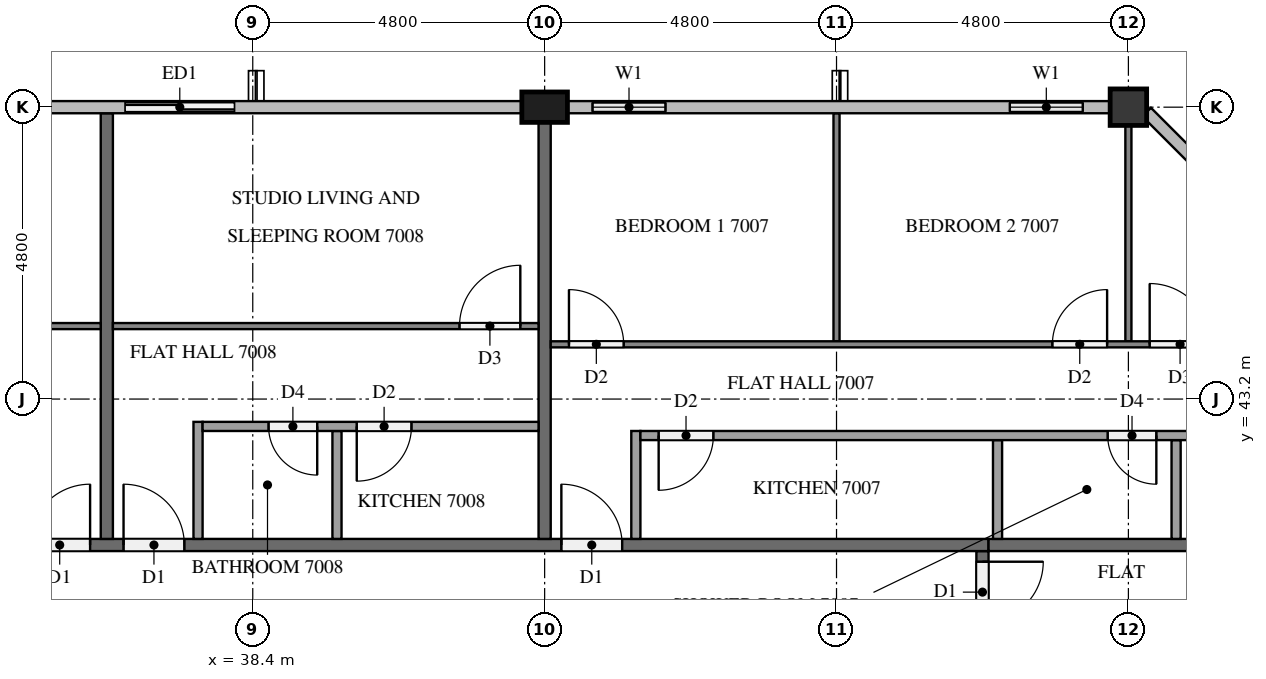
"""IFC4 building model, lengths in metres.
Left out: names, types, materials, properties, quantities, classifications, styles, units other than length and angle.
Written with IfcOpenShell. Run it as: python <this file> out.ifc"""

import sys

from ifc_helpers import new_model, si_unit, direction, frame, frame_2d, origin, origin_2d, place, context, subcontext, project, spatial, rectangle, extrude, element, fill, save


model = new_model("IFC4")
c1 = context("Model", 3, precision=1e-05, world=origin(), true_north=direction((0.0, 1.0)))
c2 = subcontext(c1, "Body", "Model", "MODEL_VIEW")
j1 = project(units=[si_unit("LENGTHUNIT", "METRE"), si_unit("PLANEANGLEUNIT", "RADIAN")], contexts=[c1])
p1 = place(None, origin())
s1 = spatial("IfcSite", under=j1, at=p1, CompositionType="ELEMENT")
p2 = place(p1, origin())
s2 = spatial("IfcBuilding", under=s1, at=p2, CompositionType="ELEMENT")
p3 = place(p2, frame((0.0, 0.0, 268.6)))
s3 = spatial("IfcBuildingStorey", under=s2, at=p3, CompositionType="ELEMENT", Elevation=268.6)
p4 = place(p3, frame((52.8, 48.0, 0.0), z_axis=(0.0, 0.0, 1.0), x_axis=(1.0, 0.0, 0.0)))
e1 = element("IfcColumn", 1, at=p4, inside=s3, PredefinedType="COLUMN", context=c2, shape_type="SweptSolid", body=[
    extrude(rectangle(XDim=0.6, YDim=0.6, at=origin_2d()), origin(), (0.0, 0.0, 1.0), 3.2),
])
p5 = place(p3, frame((43.2, 48.0, 0.0), z_axis=(0.0, 0.0, 1.0), x_axis=(1.0, 0.0, 0.0)))
e2 = element("IfcColumn", 2, at=p5, inside=s3, PredefinedType="COLUMN", context=c2, shape_type="SweptSolid", body=[
    extrude(rectangle(XDim=0.75, YDim=0.5, at=origin_2d()), origin(), (0.0, 0.0, 1.0), 3.2),
])
p6 = place(p3, frame((52.5, 48.0, 0.0), z_axis=(0.0, 0.0, 1.0), x_axis=(-1.0, 0.0, 0.0)))
e3 = element("IfcWall", 3, at=p6, inside=s3, PredefinedType="SOLIDWALL", context=c2, shape_type="SweptSolid", body=[
    extrude(rectangle(XDim=2.1, YDim=0.15, at=frame_2d((1.05, 0.0))), origin(), (0.0, 0.0, 1.0), 3.2),
])
p7 = place(p6, frame((0.45, 0.0, 0.9)))
e4 = element("IfcOpeningElement", 4, at=p7, cuts=e3, PredefinedType="OPENING", context=c2, shape_type="SweptSolid", body=[
    extrude(rectangle(XDim=1.2, YDim=1.4, at=frame_2d((0.6, 0.7))), frame((0.0, 0.085, 0.0), z_axis=(0.0, -1.0, 0.0), x_axis=(1.0, 0.0, 0.0)), (0.0, 0.0, 1.0), 0.17),
])
p8 = place(p3, frame((45.6, 48.0, 0.0), z_axis=(0.0, 0.0, 1.0), x_axis=(-1.0, 0.0, 0.0)))
e5 = element("IfcWall", 5, at=p8, inside=s3, PredefinedType="SOLIDWALL", context=c2, shape_type="SweptSolid", body=[
    extrude(rectangle(XDim=2.025, YDim=0.15, at=frame_2d((1.013, 0.0))), origin(), (0.0, 0.0, 1.0), 3.2),
])
p9 = place(p8, frame((0.413, 0.0, 0.9)))
e6 = element("IfcOpeningElement", 6, at=p9, cuts=e5, PredefinedType="OPENING", context=c2, shape_type="SweptSolid", body=[
    extrude(rectangle(XDim=1.2, YDim=1.4, at=frame_2d((0.6, 0.7))), frame((0.0, 0.085, 0.0), z_axis=(0.0, -1.0, 0.0), x_axis=(1.0, 0.0, 0.0)), (0.0, 0.0, 1.0), 0.17),
])
p10 = place(p3, frame((38.4, 48.0, 0.0), z_axis=(0.0, 0.0, 1.0), x_axis=(-1.0, 0.0, 0.0)))
e7 = element("IfcWall", 7, at=p10, inside=s3, PredefinedType="SOLIDWALL", context=c2, shape_type="SweptSolid", body=[
    extrude(rectangle(XDim=2.4, YDim=0.15, at=frame_2d((1.2, 0.0))), origin(), (0.0, 0.0, 1.0), 3.2),
])
p11 = place(p10, frame((0.3, 0.0, 0.0)))
e8 = element("IfcOpeningElement", 8, at=p11, cuts=e7, PredefinedType="OPENING", context=c2, shape_type="SweptSolid", body=[
    extrude(rectangle(XDim=1.8, YDim=2.4, at=frame_2d((0.9, 1.2))), frame((0.0, 0.085, 0.0), z_axis=(0.0, -1.0, 0.0), x_axis=(1.0, 0.0, 0.0)), (0.0, 0.0, 1.0), 0.17),
])
p12 = place(p3, frame((50.4, 40.7, 0.0), z_axis=(0.0, 0.0, 1.0), x_axis=(0.0, -1.0, 0.0)))
e9 = element("IfcWall", 9, at=p12, inside=s3, PredefinedType="PARTITIONING", context=c2, shape_type="SweptSolid", body=[
    extrude(rectangle(XDim=28.6, YDim=0.2, at=frame_2d((14.3, 0.0))), origin(), (0.0, 0.0, 1.0), 3.2),
])
p13 = place(p12, frame((27.425, 0.0, 0.0)))
e10 = element("IfcOpeningElement", 10, at=p13, cuts=e9, PredefinedType="OPENING", context=c2, shape_type="SweptSolid", body=[
    extrude(rectangle(XDim=1.0, YDim=2.1, at=frame_2d((0.5, 1.05))), frame((0.0, 0.11, 0.0), z_axis=(0.0, -1.0, 0.0), x_axis=(1.0, 0.0, 0.0)), (0.0, 0.0, 1.0), 0.22),
])
p14 = place(p12, frame((0.175, 0.0, 0.0)))
e11 = element("IfcOpeningElement", 11, at=p14, cuts=e9, PredefinedType="OPENING", context=c2, shape_type="SweptSolid", body=[
    extrude(rectangle(XDim=1.0, YDim=2.1, at=frame_2d((0.5, 1.05))), frame((0.0, 0.11, 0.0), z_axis=(0.0, -1.0, 0.0), x_axis=(1.0, 0.0, 0.0)), (0.0, 0.0, 1.0), 0.22),
])
p15 = place(p3, frame((11.9, 40.8, 0.0), z_axis=(0.0, 0.0, 1.0), x_axis=(1.0, 0.0, 0.0)))
e12 = element("IfcWall", 12, at=p15, inside=s3, PredefinedType="PARTITIONING", context=c2, shape_type="SweptSolid", body=[
    extrude(rectangle(XDim=38.6, YDim=0.2, at=frame_2d((19.3, 0.0))), origin(), (0.0, 0.0, 1.0), 3.2),
])
p16 = place(p15, frame((31.575, 0.0, 0.0)))
e13 = element("IfcOpeningElement", 13, at=p16, cuts=e12, PredefinedType="OPENING", context=c2, shape_type="SweptSolid", body=[
    extrude(rectangle(XDim=1.0, YDim=2.1, at=frame_2d((0.5, 1.05))), frame((0.0, 0.11, 0.0), z_axis=(0.0, -1.0, 0.0), x_axis=(1.0, 0.0, 0.0)), (0.0, 0.0, 1.0), 0.22),
])
p17 = place(p15, frame((24.375, 0.0, 0.0)))
e14 = element("IfcOpeningElement", 14, at=p17, cuts=e12, PredefinedType="OPENING", context=c2, shape_type="SweptSolid", body=[
    extrude(rectangle(XDim=1.0, YDim=2.1, at=frame_2d((0.5, 1.05))), frame((0.0, 0.11, 0.0), z_axis=(0.0, -1.0, 0.0), x_axis=(1.0, 0.0, 0.0)), (0.0, 0.0, 1.0), 0.22),
])
p18 = place(p15, frame((22.825, 0.0, 0.0)))
e15 = element("IfcOpeningElement", 15, at=p18, cuts=e12, PredefinedType="OPENING", context=c2, shape_type="SweptSolid", body=[
    extrude(rectangle(XDim=1.0, YDim=2.1, at=frame_2d((0.5, 1.05))), frame((0.0, 0.11, 0.0), z_axis=(0.0, -1.0, 0.0), x_axis=(1.0, 0.0, 0.0)), (0.0, 0.0, 1.0), 0.22),
])
p19 = place(p15, frame((0.375, 0.0, 0.0)))
e16 = element("IfcOpeningElement", 16, at=p19, cuts=e12, PredefinedType="OPENING", context=c2, shape_type="SweptSolid", body=[
    extrude(rectangle(XDim=1.0, YDim=2.1, at=frame_2d((0.5, 1.05))), frame((0.0, 0.11, 0.0), z_axis=(0.0, -1.0, 0.0), x_axis=(1.0, 0.0, 0.0)), (0.0, 0.0, 1.0), 0.22),
])
p20 = place(p3, frame((50.5, 40.8, 0.0), z_axis=(0.0, 0.0, 1.0), x_axis=(1.0, 0.0, 0.0)))
e17 = element("IfcWall", 17, at=p20, inside=s3, PredefinedType="PARTITIONING", context=c2, shape_type="SweptSolid", body=[
    extrude(rectangle(XDim=7.0, YDim=0.2, at=frame_2d((3.5, 0.0))), origin(), (0.0, 0.0, 1.0), 3.2),
])
p21 = place(p3, frame((43.2, 47.75, 0.0), z_axis=(0.0, 0.0, 1.0), x_axis=(0.0, -1.0, 0.0)))
e18 = element("IfcWall", 18, at=p21, inside=s3, PredefinedType="PARTITIONING", context=c2, shape_type="SweptSolid", body=[
    extrude(rectangle(XDim=6.85, YDim=0.2, at=frame_2d((3.425, 0.0))), origin(), (0.0, 0.0, 1.0), 3.2),
])
p22 = place(p3, frame((36.0, 47.9, 0.0), z_axis=(0.0, 0.0, 1.0), x_axis=(0.0, -1.0, 0.0)))
e19 = element("IfcWall", 19, at=p22, inside=s3, PredefinedType="PARTITIONING", context=c2, shape_type="SweptSolid", body=[
    extrude(rectangle(XDim=7.0, YDim=0.2, at=frame_2d((3.5, 0.0))), origin(), (0.0, 0.0, 1.0), 3.2),
])
p23 = place(p3, frame((48.0, 44.15, 0.0), z_axis=(0.0, 0.0, 1.0), x_axis=(0.0, 1.0, 0.0)))
e20 = element("IfcWall", 20, at=p23, inside=s3, PredefinedType="PARTITIONING", context=c2, shape_type="SweptSolid", body=[
    extrude(rectangle(XDim=3.75, YDim=0.1, at=frame_2d((1.875, 0.0))), origin(), (0.0, 0.0, 1.0), 3.2),
])
p24 = place(p3, frame((52.8, 44.15, 0.0), z_axis=(0.0, 0.0, 1.0), x_axis=(0.0, 1.0, 0.0)))
e21 = element("IfcWall", 21, at=p24, inside=s3, PredefinedType="PARTITIONING", context=c2, shape_type="SweptSolid", body=[
    extrude(rectangle(XDim=3.55, YDim=0.1, at=frame_2d((1.775, 0.0))), origin(), (0.0, 0.0, 1.0), 3.2),
])
p25 = place(p3, frame((43.3, 44.1, 0.0), z_axis=(0.0, 0.0, 1.0), x_axis=(1.0, 0.0, 0.0)))
e22 = element("IfcWall", 22, at=p25, inside=s3, PredefinedType="PARTITIONING", context=c2, shape_type="SweptSolid", body=[
    extrude(rectangle(XDim=13.959, YDim=0.1, at=frame_2d((6.979, 0.0))), origin(), (0.0, 0.0, 1.0), 3.2),
])
p26 = place(p25, frame((0.3, 0.0, 0.0)))
e23 = element("IfcOpeningElement", 23, at=p26, cuts=e22, PredefinedType="OPENING", context=c2, shape_type="SweptSolid", body=[
    extrude(rectangle(XDim=0.9, YDim=2.1, at=frame_2d((0.45, 1.05))), frame((0.0, 0.06, 0.0), z_axis=(0.0, -1.0, 0.0), x_axis=(1.0, 0.0, 0.0)), (0.0, 0.0, 1.0), 0.12),
])
p27 = place(p25, frame((8.25, 0.0, 0.0)))
e24 = element("IfcOpeningElement", 24, at=p27, cuts=e22, PredefinedType="OPENING", context=c2, shape_type="SweptSolid", body=[
    extrude(rectangle(XDim=0.9, YDim=2.1, at=frame_2d((0.45, 1.05))), frame((0.0, 0.06, 0.0), z_axis=(0.0, -1.0, 0.0), x_axis=(1.0, 0.0, 0.0)), (0.0, 0.0, 1.0), 0.12),
])
p28 = place(p25, frame((9.85, 0.0, 0.0)))
e25 = element("IfcOpeningElement", 25, at=p28, cuts=e22, PredefinedType="OPENING", context=c2, shape_type="SweptSolid", body=[
    extrude(rectangle(XDim=1.0, YDim=2.1, at=frame_2d((0.5, 1.05))), frame((0.0, 0.06, 0.0), z_axis=(0.0, -1.0, 0.0), x_axis=(1.0, 0.0, 0.0)), (0.0, 0.0, 1.0), 0.12),
])
for number, where, z_axis, x_axis in (
    (26, (50.648, 40.9, 0.0), (0.0, 0.0, 1.0), (0.0, 1.0, 0.0)),
    (27, (53.585, 40.9, 0.0), (0.0, 0.0, 1.0), (0.0, 1.0, 0.0)),
):
    element("IfcWall", number, at=place(p3, frame(where, z_axis=z_axis, x_axis=x_axis)), inside=s3, PredefinedType="PARTITIONING", context=c2, shape_type="SweptSolid", body=[
        extrude(rectangle(XDim=1.625, YDim=0.15, at=frame_2d((0.812, 0.0))), origin(), (0.0, 0.0, 1.0), 3.2),
    ])
p29 = place(p3, frame((44.7, 40.9, 0.0), z_axis=(0.0, 0.0, 1.0), x_axis=(0.0, 1.0, 0.0)))
e28 = element("IfcWall", 28, at=p29, inside=s3, PredefinedType="PARTITIONING", context=c2, shape_type="SweptSolid", body=[
    extrude(rectangle(XDim=1.775, YDim=0.15, at=frame_2d((0.888, 0.0))), origin(), (0.0, 0.0, 1.0), 3.2),
])
p30 = place(p3, frame((57.5, 42.6, 0.0), z_axis=(0.0, 0.0, 1.0), x_axis=(-1.0, 0.0, 0.0)))
e29 = element("IfcWall", 29, at=p30, inside=s3, PredefinedType="PARTITIONING", context=c2, shape_type="SweptSolid", body=[
    extrude(rectangle(XDim=12.725, YDim=0.15, at=frame_2d((6.363, 0.0))), origin(), (0.0, 0.0, 1.0), 3.2),
])
p31 = place(p30, frame((11.525, 0.0, 0.0)))
e30 = element("IfcOpeningElement", 30, at=p31, cuts=e29, PredefinedType="OPENING", context=c2, shape_type="SweptSolid", body=[
    extrude(rectangle(XDim=0.9, YDim=2.1, at=frame_2d((0.45, 1.05))), frame((0.0, 0.085, 0.0), z_axis=(0.0, -1.0, 0.0), x_axis=(1.0, 0.0, 0.0)), (0.0, 0.0, 1.0), 0.17),
])
p32 = place(p30, frame((4.24, 0.0, 0.0)))
e31 = element("IfcOpeningElement", 31, at=p32, cuts=e29, PredefinedType="OPENING", context=c2, shape_type="SweptSolid", body=[
    extrude(rectangle(XDim=0.8, YDim=2.1, at=frame_2d((0.4, 1.05))), frame((0.0, 0.085, 0.0), z_axis=(0.0, -1.0, 0.0), x_axis=(1.0, 0.0, 0.0)), (0.0, 0.0, 1.0), 0.17),
])
p33 = place(p30, frame((2.69, 0.0, 0.0)))
e32 = element("IfcOpeningElement", 32, at=p33, cuts=e29, PredefinedType="OPENING", context=c2, shape_type="SweptSolid", body=[
    extrude(rectangle(XDim=0.9, YDim=2.1, at=frame_2d((0.45, 1.05))), frame((0.0, 0.085, 0.0), z_axis=(0.0, -1.0, 0.0), x_axis=(1.0, 0.0, 0.0)), (0.0, 0.0, 1.0), 0.17),
])
p34 = place(p3, frame((36.1, 44.4, 0.0), z_axis=(0.0, 0.0, 1.0), x_axis=(1.0, 0.0, 0.0)))
e33 = element("IfcWall", 33, at=p34, inside=s3, PredefinedType="PARTITIONING", context=c2, shape_type="SweptSolid", body=[
    extrude(rectangle(XDim=7.0, YDim=0.1, at=frame_2d((3.5, 0.0))), origin(), (0.0, 0.0, 1.0), 3.2),
])
p35 = place(p34, frame((5.7, 0.0, 0.0)))
e34 = element("IfcOpeningElement", 34, at=p35, cuts=e33, PredefinedType="OPENING", context=c2, shape_type="SweptSolid", body=[
    extrude(rectangle(XDim=1.0, YDim=2.1, at=frame_2d((0.5, 1.05))), frame((0.0, 0.06, 0.0), z_axis=(0.0, -1.0, 0.0), x_axis=(1.0, 0.0, 0.0)), (0.0, 0.0, 1.0), 0.12),
])
p36 = place(p3, frame((39.785, 40.9, 0.0), z_axis=(0.0, 0.0, 1.0), x_axis=(0.0, 1.0, 0.0)))
e35 = element("IfcWall", 35, at=p36, inside=s3, PredefinedType="PARTITIONING", context=c2, shape_type="SweptSolid", body=[
    extrude(rectangle(XDim=1.775, YDim=0.15, at=frame_2d((0.888, 0.0))), origin(), (0.0, 0.0, 1.0), 3.2),
])
p37 = place(p3, frame((37.5, 40.9, 0.0), z_axis=(0.0, 0.0, 1.0), x_axis=(0.0, 1.0, 0.0)))
e36 = element("IfcWall", 36, at=p37, inside=s3, PredefinedType="PARTITIONING", context=c2, shape_type="SweptSolid", body=[
    extrude(rectangle(XDim=1.925, YDim=0.15, at=frame_2d((0.962, 0.0))), origin(), (0.0, 0.0, 1.0), 3.2),
])
p38 = place(p3, frame((43.1, 42.75, 0.0), z_axis=(0.0, 0.0, 1.0), x_axis=(-1.0, 0.0, 0.0)))
e37 = element("IfcWall", 37, at=p38, inside=s3, PredefinedType="PARTITIONING", context=c2, shape_type="SweptSolid", body=[
    extrude(rectangle(XDim=5.525, YDim=0.15, at=frame_2d((2.763, 0.0))), origin(), (0.0, 0.0, 1.0), 3.2),
])
p39 = place(p38, frame((3.64, 0.0, 0.0)))
e38 = element("IfcOpeningElement", 38, at=p39, cuts=e37, PredefinedType="OPENING", context=c2, shape_type="SweptSolid", body=[
    extrude(rectangle(XDim=0.8, YDim=2.1, at=frame_2d((0.4, 1.05))), frame((0.0, 0.085, 0.0), z_axis=(0.0, -1.0, 0.0), x_axis=(1.0, 0.0, 0.0)), (0.0, 0.0, 1.0), 0.17),
])
p40 = place(p38, frame((2.09, 0.0, 0.0)))
e39 = element("IfcOpeningElement", 39, at=p40, cuts=e37, PredefinedType="OPENING", context=c2, shape_type="SweptSolid", body=[
    extrude(rectangle(XDim=0.9, YDim=2.1, at=frame_2d((0.45, 1.05))), frame((0.0, 0.085, 0.0), z_axis=(0.0, -1.0, 0.0), x_axis=(1.0, 0.0, 0.0)), (0.0, 0.0, 1.0), 0.17),
])
p41 = place(p3, frame((21.7, 44.4, 0.0), z_axis=(0.0, 0.0, 1.0), x_axis=(1.0, 0.0, 0.0)))
e40 = element("IfcWall", 40, at=p41, inside=s3, PredefinedType="PARTITIONING", context=c2, shape_type="SweptSolid", body=[
    extrude(rectangle(XDim=14.2, YDim=0.1, at=frame_2d((7.1, 0.0))), origin(), (0.0, 0.0, 1.0), 3.2),
])
p42 = place(p41, frame((9.85, 0.0, 0.0)))
e41 = element("IfcOpeningElement", 41, at=p42, cuts=e40, PredefinedType="OPENING", context=c2, shape_type="SweptSolid", body=[
    extrude(rectangle(XDim=0.9, YDim=2.1, at=frame_2d((0.45, 1.05))), frame((0.0, 0.06, 0.0), z_axis=(0.0, -1.0, 0.0), x_axis=(1.0, 0.0, 0.0)), (0.0, 0.0, 1.0), 0.12),
])
p43 = place(p41, frame((8.25, 0.0, 0.0)))
e42 = element("IfcOpeningElement", 42, at=p43, cuts=e40, PredefinedType="OPENING", context=c2, shape_type="SweptSolid", body=[
    extrude(rectangle(XDim=0.9, YDim=2.1, at=frame_2d((0.45, 1.05))), frame((0.0, 0.06, 0.0), z_axis=(0.0, -1.0, 0.0), x_axis=(1.0, 0.0, 0.0)), (0.0, 0.0, 1.0), 0.12),
])
p44 = place(p41, frame((0.3, 0.0, 0.0)))
e43 = element("IfcOpeningElement", 43, at=p44, cuts=e40, PredefinedType="OPENING", context=c2, shape_type="SweptSolid", body=[
    extrude(rectangle(XDim=1.0, YDim=2.1, at=frame_2d((0.5, 1.05))), frame((0.0, 0.06, 0.0), z_axis=(0.0, -1.0, 0.0), x_axis=(1.0, 0.0, 0.0)), (0.0, 0.0, 1.0), 0.12),
])
p45 = place(p7, origin())
e44 = element("IfcWindow", 44, at=p45, inside=s3, PartitioningType="SINGLE_PANEL", PredefinedType="WINDOW", context=c2, shape_type="SweptSolid", body=[
    extrude(rectangle(XDim=1.2, YDim=1.4, at=frame_2d((0.6, 0.7))), frame((0.0, 0.03, 0.0), z_axis=(0.0, -1.0, 0.0), x_axis=(1.0, 0.0, 0.0)), (0.0, 0.0, 1.0), 0.06),
])
fill(e4, e44)
p46 = place(p9, origin())
e45 = element("IfcWindow", 45, at=p46, inside=s3, PartitioningType="SINGLE_PANEL", PredefinedType="WINDOW", context=c2, shape_type="SweptSolid", body=[
    extrude(rectangle(XDim=1.2, YDim=1.4, at=frame_2d((0.6, 0.7))), frame((0.0, 0.03, 0.0), z_axis=(0.0, -1.0, 0.0), x_axis=(1.0, 0.0, 0.0)), (0.0, 0.0, 1.0), 0.06),
])
fill(e6, e45)
p47 = place(p11, origin())
e46 = element("IfcDoor", 46, at=p47, inside=s3, OperationType="SLIDING_TO_RIGHT", PredefinedType="DOOR", context=c2, shape_type="SweptSolid", body=[
    extrude(rectangle(XDim=1.8, YDim=2.4, at=frame_2d((0.9, 1.2))), frame((0.0, 0.025, 0.0), z_axis=(0.0, -1.0, 0.0), x_axis=(1.0, 0.0, 0.0)), (0.0, 0.0, 1.0), 0.05),
])
fill(e8, e46)
p48 = place(p14, origin())
e47 = element("IfcDoor", 47, at=p48, inside=s3, OperationType="SINGLE_SWING_LEFT", PredefinedType="DOOR", context=c2, shape_type="SweptSolid", body=[
    extrude(rectangle(XDim=1.0, YDim=2.1, at=frame_2d((0.5, 1.05))), frame((0.0, 0.025, 0.0), z_axis=(0.0, -1.0, 0.0), x_axis=(1.0, 0.0, 0.0)), (0.0, 0.0, 1.0), 0.05),
])
fill(e11, e47)
p49 = place(p16, origin())
e48 = element("IfcDoor", 48, at=p49, inside=s3, OperationType="SINGLE_SWING_LEFT", PredefinedType="DOOR", context=c2, shape_type="SweptSolid", body=[
    extrude(rectangle(XDim=1.0, YDim=2.1, at=frame_2d((0.5, 1.05))), frame((0.0, 0.025, 0.0), z_axis=(0.0, -1.0, 0.0), x_axis=(1.0, 0.0, 0.0)), (0.0, 0.0, 1.0), 0.05),
])
fill(e13, e48)
p50 = place(p17, origin())
e49 = element("IfcDoor", 49, at=p50, inside=s3, OperationType="SINGLE_SWING_LEFT", PredefinedType="DOOR", context=c2, shape_type="SweptSolid", body=[
    extrude(rectangle(XDim=1.0, YDim=2.1, at=frame_2d((0.5, 1.05))), frame((0.0, 0.025, 0.0), z_axis=(0.0, -1.0, 0.0), x_axis=(1.0, 0.0, 0.0)), (0.0, 0.0, 1.0), 0.05),
])
fill(e14, e49)
p51 = place(p18, origin())
e50 = element("IfcDoor", 50, at=p51, inside=s3, OperationType="SINGLE_SWING_RIGHT", PredefinedType="DOOR", context=c2, shape_type="SweptSolid", body=[
    extrude(rectangle(XDim=1.0, YDim=2.1, at=frame_2d((0.5, 1.05))), frame((0.0, 0.025, 0.0), z_axis=(0.0, -1.0, 0.0), x_axis=(1.0, 0.0, 0.0)), (0.0, 0.0, 1.0), 0.05),
])
fill(e15, e50)
p52 = place(p26, origin())
e51 = element("IfcDoor", 51, at=p52, inside=s3, OperationType="SINGLE_SWING_LEFT", PredefinedType="DOOR", context=c2, shape_type="SweptSolid", body=[
    extrude(rectangle(XDim=0.9, YDim=2.1, at=frame_2d((0.45, 1.05))), frame((0.0, 0.025, 0.0), z_axis=(0.0, -1.0, 0.0), x_axis=(1.0, 0.0, 0.0)), (0.0, 0.0, 1.0), 0.05),
])
fill(e23, e51)
p53 = place(p27, origin())
e52 = element("IfcDoor", 52, at=p53, inside=s3, OperationType="SINGLE_SWING_RIGHT", PredefinedType="DOOR", context=c2, shape_type="SweptSolid", body=[
    extrude(rectangle(XDim=0.9, YDim=2.1, at=frame_2d((0.45, 1.05))), frame((0.0, 0.025, 0.0), z_axis=(0.0, -1.0, 0.0), x_axis=(1.0, 0.0, 0.0)), (0.0, 0.0, 1.0), 0.05),
])
fill(e24, e52)
p54 = place(p28, origin())
e53 = element("IfcDoor", 53, at=p54, inside=s3, OperationType="SINGLE_SWING_LEFT", PredefinedType="DOOR", context=c2, shape_type="SweptSolid", body=[
    extrude(rectangle(XDim=1.0, YDim=2.1, at=frame_2d((0.5, 1.05))), frame((0.0, 0.025, 0.0), z_axis=(0.0, -1.0, 0.0), x_axis=(1.0, 0.0, 0.0)), (0.0, 0.0, 1.0), 0.05),
])
fill(e25, e53)
p55 = place(p31, origin())
e54 = element("IfcDoor", 54, at=p55, inside=s3, OperationType="SINGLE_SWING_RIGHT", PredefinedType="DOOR", context=c2, shape_type="SweptSolid", body=[
    extrude(rectangle(XDim=0.9, YDim=2.1, at=frame_2d((0.45, 1.05))), frame((0.0, 0.025, 0.0), z_axis=(0.0, -1.0, 0.0), x_axis=(1.0, 0.0, 0.0)), (0.0, 0.0, 1.0), 0.05),
])
fill(e30, e54)
p56 = place(p32, origin())
e55 = element("IfcDoor", 55, at=p56, inside=s3, OperationType="SINGLE_SWING_LEFT", PredefinedType="DOOR", context=c2, shape_type="SweptSolid", body=[
    extrude(rectangle(XDim=0.8, YDim=2.1, at=frame_2d((0.4, 1.05))), frame((0.0, 0.025, 0.0), z_axis=(0.0, -1.0, 0.0), x_axis=(1.0, 0.0, 0.0)), (0.0, 0.0, 1.0), 0.05),
])
fill(e31, e55)
p57 = place(p35, origin())
e56 = element("IfcDoor", 56, at=p57, inside=s3, OperationType="SINGLE_SWING_RIGHT", PredefinedType="DOOR", context=c2, shape_type="SweptSolid", body=[
    extrude(rectangle(XDim=1.0, YDim=2.1, at=frame_2d((0.5, 1.05))), frame((0.0, 0.025, 0.0), z_axis=(0.0, -1.0, 0.0), x_axis=(1.0, 0.0, 0.0)), (0.0, 0.0, 1.0), 0.05),
])
fill(e34, e56)
p58 = place(p39, origin())
e57 = element("IfcDoor", 57, at=p58, inside=s3, OperationType="SINGLE_SWING_LEFT", PredefinedType="DOOR", context=c2, shape_type="SweptSolid", body=[
    extrude(rectangle(XDim=0.8, YDim=2.1, at=frame_2d((0.4, 1.05))), frame((0.0, 0.025, 0.0), z_axis=(0.0, -1.0, 0.0), x_axis=(1.0, 0.0, 0.0)), (0.0, 0.0, 1.0), 0.05),
])
fill(e38, e57)
p59 = place(p40, origin())
e58 = element("IfcDoor", 58, at=p59, inside=s3, OperationType="SINGLE_SWING_RIGHT", PredefinedType="DOOR", context=c2, shape_type="SweptSolid", body=[
    extrude(rectangle(XDim=0.9, YDim=2.1, at=frame_2d((0.45, 1.05))), frame((0.0, 0.025, 0.0), z_axis=(0.0, -1.0, 0.0), x_axis=(1.0, 0.0, 0.0)), (0.0, 0.0, 1.0), 0.05),
])
fill(e39, e58)
save(model, sys.argv[1])
